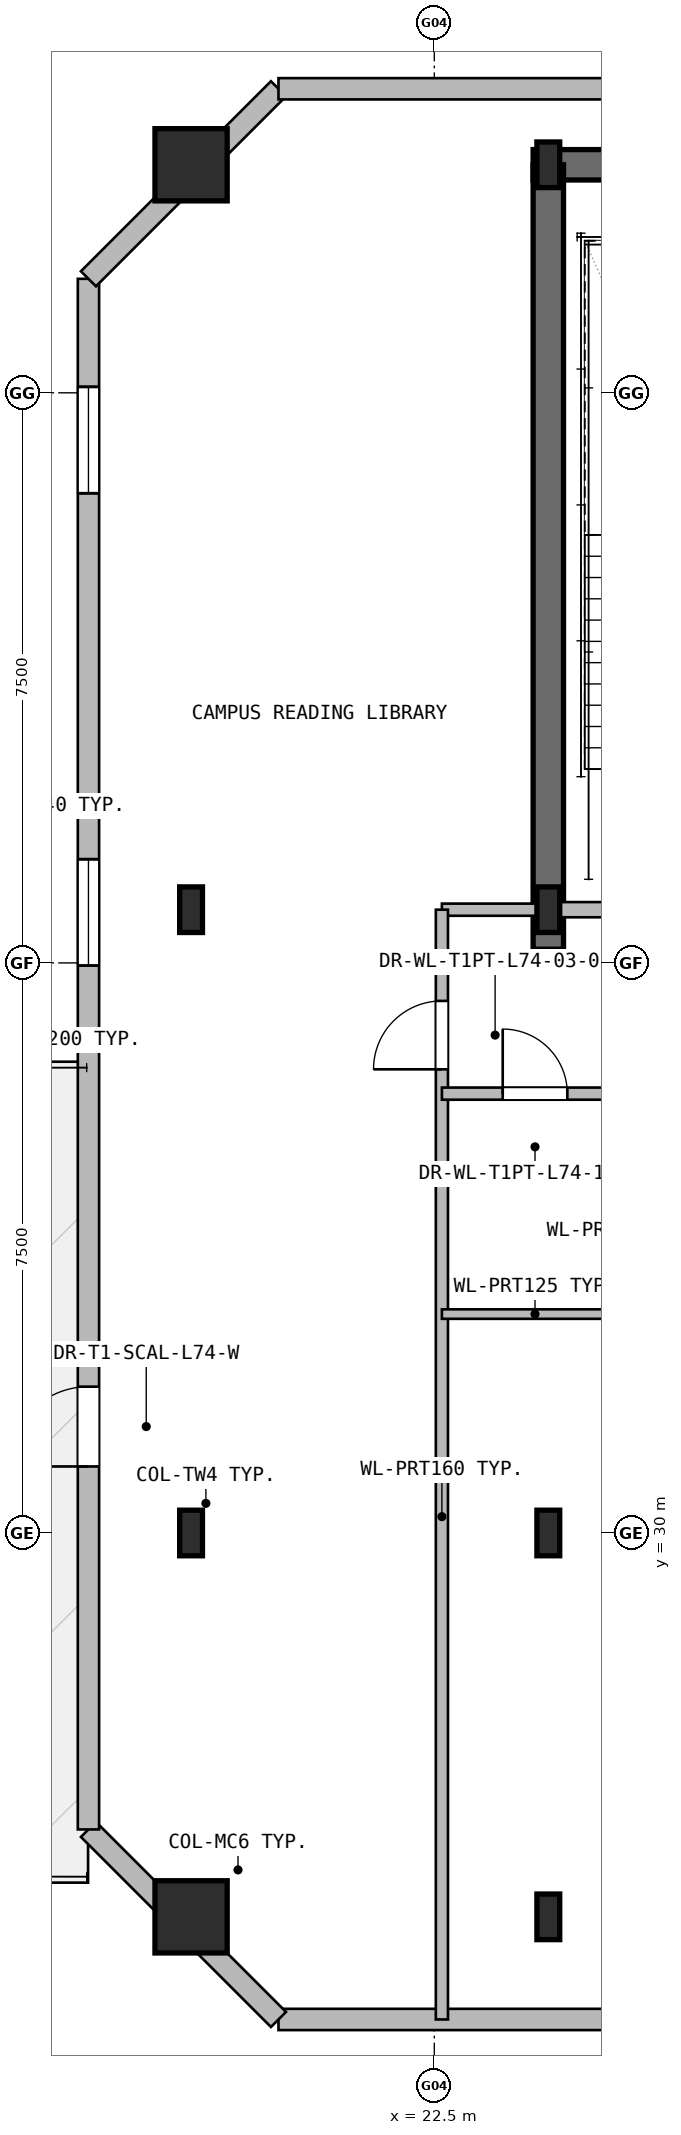
"""IFC4 building model, lengths in metres.
Left out: names, types, materials, properties, quantities, classifications, styles, units other than length and angle.
Written with IfcOpenShell. Run it as: python <this file> out.ifc"""

import sys

from ifc_helpers import new_model, si_unit, direction, frame, frame_2d, origin, origin_2d, place, context, subcontext, project, spatial, rectangle, hollow_rectangle, i_section, extrude, element, fill, save


model = new_model("IFC4")
c1 = context("Model", 3, precision=1e-05, world=origin(), true_north=direction((0.0, 1.0)))
c2 = subcontext(c1, "Body", "Model", "MODEL_VIEW")
j1 = project(units=[si_unit("LENGTHUNIT", "METRE"), si_unit("PLANEANGLEUNIT", "RADIAN")], contexts=[c1])
p1 = place(None, origin())
s1 = spatial("IfcSite", under=j1, at=p1, CompositionType="ELEMENT")
p2 = place(p1, origin())
s2 = spatial("IfcBuilding", under=s1, at=p2, CompositionType="ELEMENT")
p3 = place(p2, frame((0.0, 0.0, 265.8)))
s3 = spatial("IfcBuildingStorey", under=s2, at=p3, CompositionType="ELEMENT", Elevation=265.8)
p4 = place(p3, frame((23.8, 48.0, 0.0), z_axis=(0.0, 0.0, 1.0), x_axis=(1.0, 0.0, 0.0)))
e1 = element("IfcWall", 1, at=p4, inside=s3, PredefinedType="SHEAR", context=c2, shape_type="SweptSolid", body=[
    extrude(rectangle(XDim=27.4, YDim=0.4, at=frame_2d((13.7, 0.0))), origin(), (0.0, 0.0, 1.0), 4.2),
])
p5 = place(p3, frame((24.0, 37.68, 0.0), z_axis=(0.0, 0.0, 1.0), x_axis=(0.0, 1.0, 0.0)))
e2 = element("IfcWall", 2, at=p5, inside=s3, PredefinedType="SHEAR", context=c2, shape_type="SweptSolid", body=[
    extrude(rectangle(XDim=10.32, YDim=0.4, at=frame_2d((5.16, 0.0))), origin(), (0.0, 0.0, 1.0), 4.2),
])
p6 = place(p3, frame((19.3, 24.95, 0.0), z_axis=(0.0, 0.0, 1.0), x_axis=(1.0, 0.0, 0.0)))
e3 = element("IfcColumn", 3, at=p6, inside=s3, PredefinedType="COLUMN", context=c2, shape_type="SweptSolid", body=[
    extrude(hollow_rectangle(XDim=0.95, YDim=0.95, WallThickness=0.028, at=origin_2d()), origin(), (0.0, 0.0, 1.0), 4.2),
])
for number, where, z_axis, x_axis in (
    (4, (19.3, 30.0, 0.0), (0.0, 0.0, 1.0), (1.0, 0.0, 0.0)),
    (5, (19.3, 38.2, 0.0), (0.0, 0.0, 1.0), (1.0, 0.0, 0.0)),
):
    element("IfcColumn", number, at=place(p3, frame(where, z_axis=z_axis, x_axis=x_axis)), inside=s3, PredefinedType="COLUMN", context=c2, shape_type="SweptSolid", body=[
        extrude(i_section(OverallWidth=0.3, OverallDepth=0.6, WebThickness=0.014, FlangeThickness=0.025, at=origin_2d()), origin(), (0.0, 0.0, 1.0), 4.2),
    ])
p7 = place(p3, frame((19.3, 48.0, 0.0), z_axis=(0.0, 0.0, 1.0), x_axis=(1.0, 0.0, 0.0)))
e6 = element("IfcColumn", 6, at=p7, inside=s3, PredefinedType="COLUMN", context=c2, shape_type="SweptSolid", body=[
    extrude(hollow_rectangle(XDim=0.95, YDim=0.95, WallThickness=0.028, at=origin_2d()), origin(), (0.0, 0.0, 1.0), 4.2),
])
for number, where, z_axis, x_axis in (
    (7, (24.0, 24.95, 0.0), (0.0, 0.0, 1.0), (1.0, 0.0, 0.0)),
    (8, (24.0, 30.0, 0.0), (0.0, 0.0, 1.0), (1.0, 0.0, 0.0)),
    (9, (24.0, 38.2, 0.0), (0.0, 0.0, 1.0), (1.0, 0.0, 0.0)),
    (10, (24.0, 48.0, 0.0), (0.0, 0.0, 1.0), (1.0, 0.0, 0.0)),
):
    element("IfcColumn", number, at=place(p3, frame(where, z_axis=z_axis, x_axis=x_axis)), inside=s3, PredefinedType="COLUMN", context=c2, shape_type="SweptSolid", body=[
        extrude(i_section(OverallWidth=0.3, OverallDepth=0.6, WebThickness=0.014, FlangeThickness=0.025, at=origin_2d()), origin(), (0.0, 0.0, 1.0), 4.2),
    ])
p8 = place(p3, frame((54.55, 23.6, 0.0), z_axis=(0.0, 0.0, 1.0), x_axis=(-1.0, 0.0, 0.0)))
e11 = element("IfcWall", 11, at=p8, inside=s3, PredefinedType="SOLIDWALL", context=c2, shape_type="SweptSolid", body=[
    extrude(rectangle(XDim=34.1, YDim=0.28, at=frame_2d((17.05, 0.0))), origin(), (0.0, 0.0, 1.0), 3.93),
])
p9 = place(p8, frame((17.728, 0.0, 0.8)))
e12 = element("IfcOpeningElement", 12, at=p9, cuts=e11, PredefinedType="OPENING", context=c2, shape_type="SweptSolid", body=[
    extrude(rectangle(XDim=1.1, YDim=1.5, at=frame_2d((0.55, 0.75))), frame((0.0, 0.15, 0.0), z_axis=(0.0, -1.0, 0.0), x_axis=(1.0, 0.0, 0.0)), (0.0, 0.0, 1.0), 0.3),
])
p10 = place(p8, frame((15.279, 0.0, 0.8)))
e13 = element("IfcOpeningElement", 13, at=p10, cuts=e11, PredefinedType="OPENING", context=c2, shape_type="SweptSolid", body=[
    extrude(rectangle(XDim=1.1, YDim=1.5, at=frame_2d((0.55, 0.75))), frame((0.0, 0.15, 0.0), z_axis=(0.0, -1.0, 0.0), x_axis=(1.0, 0.0, 0.0)), (0.0, 0.0, 1.0), 0.3),
])
p11 = place(p3, frame((20.45, 23.6, 0.0), z_axis=(0.0, 0.0, 1.0), x_axis=(-0.707106781187, 0.707106781187, 0.0)))
e14 = element("IfcWall", 14, at=p11, inside=s3, PredefinedType="SOLIDWALL", context=c2, shape_type="SweptSolid", body=[
    extrude(rectangle(XDim=3.536, YDim=0.28, at=frame_2d((1.768, 0.0))), origin(), (0.0, 0.0, 1.0), 3.93),
])
p12 = place(p3, frame((17.95, 26.1, 0.0), z_axis=(0.0, 0.0, 1.0), x_axis=(0.0, 1.0, 0.0)))
e15 = element("IfcWall", 15, at=p12, inside=s3, PredefinedType="SOLIDWALL", context=c2, shape_type="SweptSolid", body=[
    extrude(rectangle(XDim=20.4, YDim=0.28, at=frame_2d((10.2, 0.0))), origin(), (0.0, 0.0, 1.0), 3.93),
])
p13 = place(p12, frame((4.775, 0.0, 0.0)))
e16 = element("IfcOpeningElement", 16, at=p13, cuts=e15, PredefinedType="OPENING", context=c2, shape_type="SweptSolid", body=[
    extrude(rectangle(XDim=1.05, YDim=2.1, at=frame_2d((0.525, 1.05))), frame((0.0, 0.15, 0.0), z_axis=(0.0, -1.0, 0.0), x_axis=(1.0, 0.0, 0.0)), (0.0, 0.0, 1.0), 0.3),
])
p14 = place(p12, frame((11.364, 0.0, 0.8)))
e17 = element("IfcOpeningElement", 17, at=p14, cuts=e15, PredefinedType="OPENING", context=c2, shape_type="SweptSolid", body=[
    extrude(rectangle(XDim=1.4, YDim=1.65, at=frame_2d((0.7, 0.825))), frame((0.0, 0.15, 0.0), z_axis=(0.0, -1.0, 0.0), x_axis=(1.0, 0.0, 0.0)), (0.0, 0.0, 1.0), 0.3),
])
p15 = place(p12, frame((17.579, 0.0, 0.8)))
e18 = element("IfcOpeningElement", 18, at=p15, cuts=e15, PredefinedType="OPENING", context=c2, shape_type="SweptSolid", body=[
    extrude(rectangle(XDim=1.4, YDim=1.65, at=frame_2d((0.7, 0.825))), frame((0.0, 0.15, 0.0), z_axis=(0.0, -1.0, 0.0), x_axis=(1.0, 0.0, 0.0)), (0.0, 0.0, 1.0), 0.3),
])
p16 = place(p3, frame((17.95, 46.5, 0.0), z_axis=(0.0, 0.0, 1.0), x_axis=(0.707106781187, 0.707106781187, 0.0)))
e19 = element("IfcWall", 19, at=p16, inside=s3, PredefinedType="SOLIDWALL", context=c2, shape_type="SweptSolid", body=[
    extrude(rectangle(XDim=3.536, YDim=0.28, at=frame_2d((1.768, 0.0))), origin(), (0.0, 0.0, 1.0), 3.93),
])
p17 = place(p3, frame((20.45, 49.0, 0.0), z_axis=(0.0, 0.0, 1.0), x_axis=(1.0, 0.0, 0.0)))
e20 = element("IfcWall", 20, at=p17, inside=s3, PredefinedType="SOLIDWALL", context=c2, shape_type="SweptSolid", body=[
    extrude(rectangle(XDim=34.1, YDim=0.28, at=frame_2d((17.05, 0.0))), origin(), (0.0, 0.0, 1.0), 3.93),
])
p18 = place(p3, frame((24.0, 38.2, 0.0), z_axis=(0.0, 0.0, 1.0), x_axis=(1.0, 0.0, 0.0)))
e21 = element("IfcWall", 21, at=p18, inside=s3, PredefinedType="PARTITIONING", context=c2, shape_type="SweptSolid", body=[
    extrude(rectangle(XDim=3.95, YDim=0.2, at=frame_2d((1.975, 0.0))), origin(), (0.0, 0.0, 1.0), 3.33),
])
p19 = place(p18, frame((2.05, 0.0, 0.0)))
e22 = element("IfcOpeningElement", 22, at=p19, cuts=e21, PredefinedType="OPENING", context=c2, shape_type="SweptSolid", body=[
    extrude(rectangle(XDim=1.12, YDim=2.1, at=frame_2d((0.56, 1.05))), frame((0.0, 0.11, 0.0), z_axis=(0.0, -1.0, 0.0), x_axis=(1.0, 0.0, 0.0)), (0.0, 0.0, 1.0), 0.22),
])
p20 = place(p3, frame((22.6, 38.2, 0.0), z_axis=(0.0, 0.0, 1.0), x_axis=(1.0, 0.0, 0.0)))
e23 = element("IfcWall", 23, at=p20, inside=s3, PredefinedType="PARTITIONING", context=c2, shape_type="SweptSolid", body=[
    extrude(rectangle(XDim=1.4, YDim=0.16, at=frame_2d((0.7, 0.0))), origin(), (0.0, 0.0, 1.0), 3.33),
])
p21 = place(p3, frame((22.6, 23.6, 0.0), z_axis=(0.0, 0.0, 1.0), x_axis=(0.0, 1.0, 0.0)))
e24 = element("IfcWall", 24, at=p21, inside=s3, PredefinedType="PARTITIONING", context=c2, shape_type="SweptSolid", body=[
    extrude(rectangle(XDim=14.6, YDim=0.16, at=frame_2d((7.3, 0.0))), origin(), (0.0, 0.0, 1.0), 3.93),
])
p22 = place(p21, frame((12.5, 0.0, 0.0)))
e25 = element("IfcOpeningElement", 25, at=p22, cuts=e24, PredefinedType="OPENING", context=c2, shape_type="SweptSolid", body=[
    extrude(rectangle(XDim=0.9, YDim=2.05, at=frame_2d((0.45, 1.025))), frame((0.0, 0.09, 0.0), z_axis=(0.0, -1.0, 0.0), x_axis=(1.0, 0.0, 0.0)), (0.0, 0.0, 1.0), 0.18),
])
p23 = place(p3, frame((22.6, 32.88, 0.0), z_axis=(0.0, 0.0, 1.0), x_axis=(1.0, 0.0, 0.0)))
e26 = element("IfcWall", 26, at=p23, inside=s3, PredefinedType="PARTITIONING", context=c2, shape_type="SweptSolid", body=[
    extrude(rectangle(XDim=2.45, YDim=0.125, at=frame_2d((1.225, 0.0))), origin(), (0.0, 0.0, 1.0), 3.93),
])
p24 = place(p3, frame((22.6, 35.78, 0.0), z_axis=(0.0, 0.0, 1.0), x_axis=(1.0, 0.0, 0.0)))
e27 = element("IfcWall", 27, at=p24, inside=s3, PredefinedType="PARTITIONING", context=c2, shape_type="SweptSolid", body=[
    extrude(rectangle(XDim=29.8, YDim=0.16, at=frame_2d((14.9, 0.0))), origin(), (0.0, 0.0, 1.0), 3.93),
])
p25 = place(p24, frame((0.8, 0.0, 0.0)))
e28 = element("IfcOpeningElement", 28, at=p25, cuts=e27, PredefinedType="OPENING", context=c2, shape_type="SweptSolid", body=[
    extrude(rectangle(XDim=0.85, YDim=2.05, at=frame_2d((0.425, 1.025))), frame((0.0, 0.09, 0.0), z_axis=(0.0, -1.0, 0.0), x_axis=(1.0, 0.0, 0.0)), (0.0, 0.0, 1.0), 0.18),
])
p26 = place(p24, frame((4.351, 0.0, 0.0)))
e29 = element("IfcOpeningElement", 29, at=p26, cuts=e27, PredefinedType="OPENING", context=c2, shape_type="SweptSolid", body=[
    extrude(rectangle(XDim=0.9, YDim=2.05, at=frame_2d((0.45, 1.025))), frame((0.0, 0.09, 0.0), z_axis=(0.0, -1.0, 0.0), x_axis=(1.0, 0.0, 0.0)), (0.0, 0.0, 1.0), 0.18),
])
p27 = place(p24, frame((9.562, 0.0, 0.0)))
e30 = element("IfcOpeningElement", 30, at=p27, cuts=e27, PredefinedType="OPENING", context=c2, shape_type="SweptSolid", body=[
    extrude(rectangle(XDim=0.85, YDim=2.05, at=frame_2d((0.425, 1.025))), frame((0.0, 0.09, 0.0), z_axis=(0.0, -1.0, 0.0), x_axis=(1.0, 0.0, 0.0)), (0.0, 0.0, 1.0), 0.18),
])
p28 = place(p24, frame((13.262, 0.0, 0.0)))
e31 = element("IfcOpeningElement", 31, at=p28, cuts=e27, PredefinedType="OPENING", context=c2, shape_type="SweptSolid", body=[
    extrude(rectangle(XDim=0.9, YDim=2.05, at=frame_2d((0.45, 1.025))), frame((0.0, 0.09, 0.0), z_axis=(0.0, -1.0, 0.0), x_axis=(1.0, 0.0, 0.0)), (0.0, 0.0, 1.0), 0.18),
])
p29 = place(p24, frame((18.001, 0.0, 0.0)))
e32 = element("IfcOpeningElement", 32, at=p29, cuts=e27, PredefinedType="OPENING", context=c2, shape_type="SweptSolid", body=[
    extrude(rectangle(XDim=0.95, YDim=2.1, at=frame_2d((0.475, 1.05))), frame((0.0, 0.09, 0.0), z_axis=(0.0, -1.0, 0.0), x_axis=(1.0, 0.0, 0.0)), (0.0, 0.0, 1.0), 0.18),
])
p30 = place(p24, frame((26.54, 0.0, 0.0)))
e33 = element("IfcOpeningElement", 33, at=p30, cuts=e27, PredefinedType="OPENING", context=c2, shape_type="SweptSolid", body=[
    extrude(rectangle(XDim=0.85, YDim=2.05, at=frame_2d((0.425, 1.025))), frame((0.0, 0.09, 0.0), z_axis=(0.0, -1.0, 0.0), x_axis=(1.0, 0.0, 0.0)), (0.0, 0.0, 1.0), 0.18),
])
p31 = place(p24, frame((22.79, 0.0, 0.0)))
e34 = element("IfcOpeningElement", 34, at=p31, cuts=e27, PredefinedType="OPENING", context=c2, shape_type="SweptSolid", body=[
    extrude(rectangle(XDim=0.9, YDim=2.05, at=frame_2d((0.45, 1.025))), frame((0.0, 0.09, 0.0), z_axis=(0.0, -1.0, 0.0), x_axis=(1.0, 0.0, 0.0)), (0.0, 0.0, 1.0), 0.18),
])
p32 = place(p13, origin())
e35 = element("IfcDoor", 35, at=p32, inside=s3, OperationType="SINGLE_SWING_LEFT", PredefinedType="DOOR", context=c2, shape_type="SweptSolid", body=[
    extrude(rectangle(XDim=1.05, YDim=2.1, at=frame_2d((0.525, 1.05))), frame((0.0, 0.025, 0.0), z_axis=(0.0, -1.0, 0.0), x_axis=(1.0, 0.0, 0.0)), (0.0, 0.0, 1.0), 0.05),
])
fill(e16, e35)
p33 = place(p14, origin())
e36 = element("IfcWindow", 36, at=p33, inside=s3, PartitioningType="SINGLE_PANEL", PredefinedType="WINDOW", context=c2, shape_type="SweptSolid", body=[
    extrude(rectangle(XDim=1.4, YDim=1.65, at=frame_2d((0.7, 0.825))), frame((0.0, 0.03, 0.0), z_axis=(0.0, -1.0, 0.0), x_axis=(1.0, 0.0, 0.0)), (0.0, 0.0, 1.0), 0.06),
])
fill(e17, e36)
p34 = place(p15, origin())
e37 = element("IfcWindow", 37, at=p34, inside=s3, PartitioningType="SINGLE_PANEL", PredefinedType="WINDOW", context=c2, shape_type="SweptSolid", body=[
    extrude(rectangle(XDim=1.4, YDim=1.65, at=frame_2d((0.7, 0.825))), frame((0.0, 0.03, 0.0), z_axis=(0.0, -1.0, 0.0), x_axis=(1.0, 0.0, 0.0)), (0.0, 0.0, 1.0), 0.06),
])
fill(e18, e37)
p35 = place(p22, origin())
e38 = element("IfcDoor", 38, at=p35, inside=s3, OperationType="SINGLE_SWING_RIGHT", PredefinedType="DOOR", context=c2, shape_type="SweptSolid", body=[
    extrude(rectangle(XDim=0.9, YDim=2.05, at=frame_2d((0.45, 1.025))), frame((0.0, 0.025, 0.0), z_axis=(0.0, -1.0, 0.0), x_axis=(1.0, 0.0, 0.0)), (0.0, 0.0, 1.0), 0.05),
])
fill(e25, e38)
p36 = place(p25, origin())
e39 = element("IfcDoor", 39, at=p36, inside=s3, OperationType="SINGLE_SWING_RIGHT", PredefinedType="DOOR", context=c2, shape_type="SweptSolid", body=[
    extrude(rectangle(XDim=0.85, YDim=2.05, at=frame_2d((0.425, 1.025))), frame((0.0, 0.025, 0.0), z_axis=(0.0, -1.0, 0.0), x_axis=(1.0, 0.0, 0.0)), (0.0, 0.0, 1.0), 0.05),
])
fill(e28, e39)
save(model, sys.argv[1])
